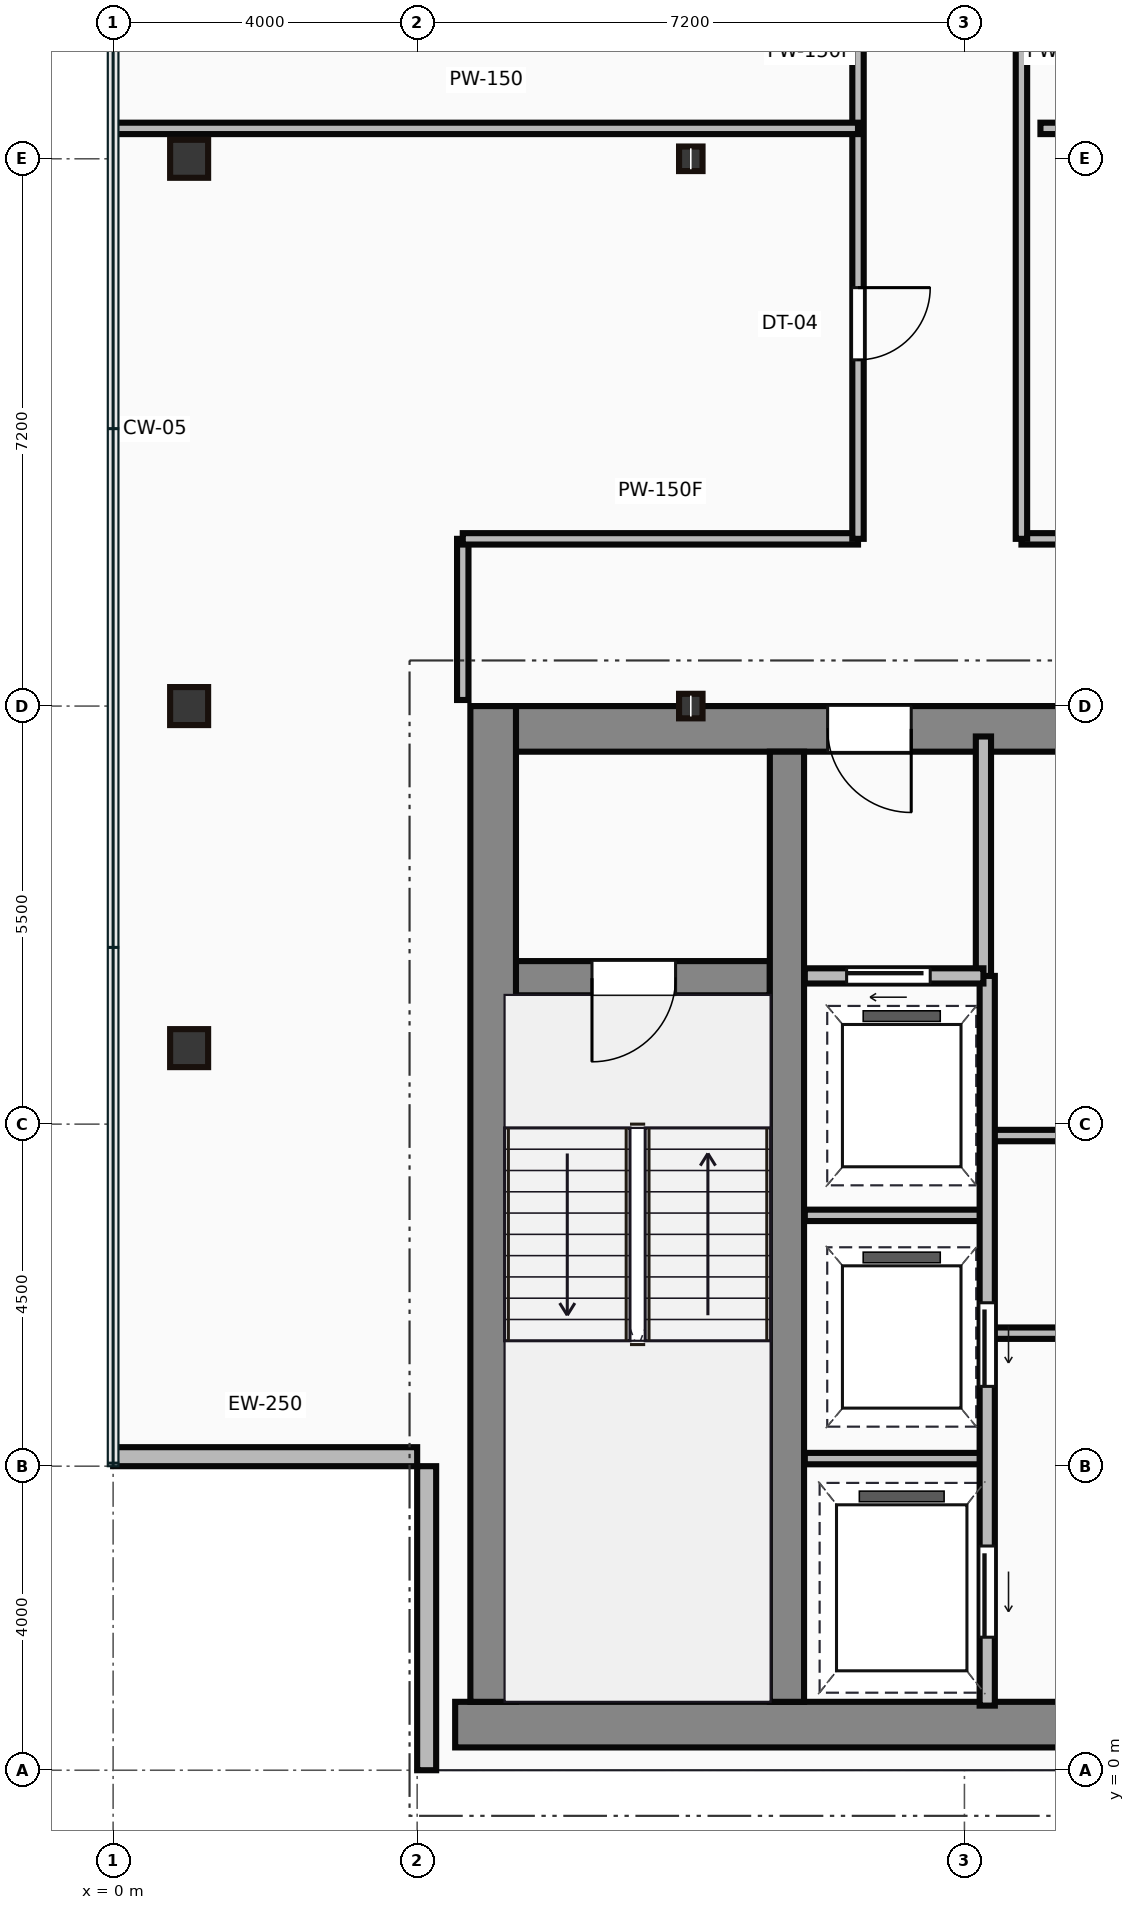
"""IFC4 building model, lengths in metres.
Left out: names, types, materials, properties, quantities, classifications, styles, units other than length and angle.
Written with IfcOpenShell. Run it as: python <this file> out.ifc"""

import sys

from ifc_helpers import new_model, si_unit, direction, frame, frame_2d, origin, origin_2d, place, context, subcontext, project, spatial, rectangle, hollow_rectangle, i_section, extrude, source, transform, mapped, element, fill, save


model = new_model("IFC4")
c1 = context("Model", 3, precision=1e-05, world=origin(), true_north=direction((0.0, 1.0)))
c2 = subcontext(c1, "Body", "Model", "MODEL_VIEW")
j1 = project(units=[si_unit("LENGTHUNIT", "METRE"), si_unit("PLANEANGLEUNIT", "RADIAN")], contexts=[c1])
p1 = place(None, origin())
s1 = spatial("IfcSite", under=j1, at=p1, CompositionType="ELEMENT")
p2 = place(p1, origin())
s2 = spatial("IfcBuilding", under=s1, at=p2, CompositionType="ELEMENT")
p3 = place(p2, frame((0.0, 0.0, 277.05)))
s3 = spatial("IfcBuildingStorey", under=s2, at=p3, CompositionType="ELEMENT", Elevation=277.05)
m1 = source(origin(), c2, "Body", "SweptSolid", [
    extrude(rectangle(XDim=29.5, YDim=0.6, at=frame_2d((14.75, 0.0))), origin(), (0.0, 0.0, 1.0), 3.65),
])
p4 = place(p3, frame((4.5, 0.6, 0.0), z_axis=(0.0, 0.0, 1.0), x_axis=(1.0, 0.0, 0.0)))
e1 = element("IfcWall", 1, at=p4, inside=s3, PredefinedType="SHEAR", context=c2, shape_type="MappedRepresentation", body=[
    mapped(m1, transform((0.0, 0.0, 0.0))),
])
m2 = source(origin(), c2, "Body", "SweptSolid", [
    extrude(rectangle(XDim=13.1, YDim=0.6, at=frame_2d((6.55, 0.0))), origin(), (0.0, 0.0, 1.0), 3.65),
])
p5 = place(p3, frame((5.0, 0.9, 0.0), z_axis=(0.0, 0.0, 1.0), x_axis=(0.0, 1.0, 0.0)))
e2 = element("IfcWall", 2, at=p5, inside=s3, PredefinedType="SHEAR", context=c2, shape_type="MappedRepresentation", body=[
    mapped(m2, transform((0.0, 0.0, 0.0))),
])
m3 = source(origin(), c2, "Body", "SweptSolid", [
    extrude(rectangle(XDim=9.1, YDim=0.6, at=frame_2d((4.55, 0.0))), origin(), (0.0, 0.0, 1.0), 3.65),
])
p6 = place(p3, frame((5.3, 13.7, 0.0), z_axis=(0.0, 0.0, 1.0), x_axis=(1.0, 0.0, 0.0)))
e3 = element("IfcWall", 3, at=p6, inside=s3, PredefinedType="SHEAR", context=c2, shape_type="MappedRepresentation", body=[
    mapped(m3, transform((0.0, 0.0, 0.0))),
])
p7 = place(p6, frame((4.1, 0.0, 0.0)))
e4 = element("IfcOpeningElement", 4, at=p7, cuts=e3, PredefinedType="OPENING", context=c2, shape_type="SweptSolid", body=[
    extrude(rectangle(XDim=1.1, YDim=2.15, at=frame_2d((0.55, 1.075))), frame((0.0, 0.31, 0.0), z_axis=(0.0, -1.0, 0.0), x_axis=(1.0, 0.0, 0.0)), (0.0, 0.0, 1.0), 0.62),
])
m4 = source(origin(), c2, "Body", "SweptSolid", [
    extrude(rectangle(XDim=12.5, YDim=0.45, at=frame_2d((6.25, 0.0))), origin(), (0.0, 0.0, 1.0), 3.65),
])
p8 = place(p3, frame((8.865, 0.9, 0.0), z_axis=(0.0, 0.0, 1.0), x_axis=(0.0, 1.0, 0.0)))
e5 = element("IfcWall", 5, at=p8, inside=s3, PredefinedType="SHEAR", context=c2, shape_type="MappedRepresentation", body=[
    mapped(m4, transform((0.0, 0.0, 0.0))),
])
m5 = source(origin(), c2, "Body", "SweptSolid", [
    extrude(rectangle(XDim=3.39, YDim=0.45, at=frame_2d((1.695, 0.0))), origin(), (0.0, 0.0, 1.0), 3.65),
])
p9 = place(p3, frame((5.25, 10.42, 0.0), z_axis=(0.0, 0.0, 1.0), x_axis=(1.0, 0.0, 0.0)))
e6 = element("IfcWall", 6, at=p9, inside=s3, PredefinedType="SHEAR", context=c2, shape_type="MappedRepresentation", body=[
    mapped(m5, transform((0.0, 0.0, 0.0))),
])
p10 = place(p9, frame((1.05, 0.0, 0.0)))
e7 = element("IfcOpeningElement", 7, at=p10, cuts=e6, PredefinedType="OPENING", context=c2, shape_type="SweptSolid", body=[
    extrude(rectangle(XDim=1.1, YDim=2.15, at=frame_2d((0.55, 1.075))), frame((0.0, 0.235, 0.0), z_axis=(0.0, -1.0, 0.0), x_axis=(1.0, 0.0, 0.0)), (0.0, 0.0, 1.0), 0.47),
])
m6 = source(origin(), c2, "Body", "SweptSolid", [
    extrude(hollow_rectangle(XDim=0.5, YDim=0.5, WallThickness=0.022, at=origin_2d()), origin(), (0.0, 0.0, 1.0), 3.65),
])
for number, where, z_axis, x_axis in (
    (8, (1.0, 9.5, 0.0), (0.0, 0.0, 1.0), (1.0, 0.0, 0.0)),
    (9, (1.0, 14.0, 0.0), (0.0, 0.0, 1.0), (1.0, 0.0, 0.0)),
    (10, (1.0, 21.2, 0.0), (0.0, 0.0, 1.0), (1.0, 0.0, 0.0)),
):
    element("IfcColumn", number, at=place(p3, frame(where, z_axis=z_axis, x_axis=x_axis)), inside=s3, PredefinedType="COLUMN", context=c2, shape_type="MappedRepresentation", body=[
        mapped(m6, transform((0.0, 0.0, 0.0))),
    ])
m7 = source(origin(), c2, "Body", "SweptSolid", [
    extrude(i_section(OverallWidth=0.309, OverallDepth=0.323, WebThickness=0.014, FlangeThickness=0.023, at=origin_2d()), origin(), (0.0, 0.0, 1.0), 3.65),
])
for number, where, z_axis, x_axis in (
    (11, (7.6, 14.0, 0.0), (0.0, 0.0, 1.0), (1.0, 0.0, 0.0)),
    (12, (7.6, 21.2, 0.0), (0.0, 0.0, 1.0), (1.0, 0.0, 0.0)),
):
    element("IfcColumn", number, at=place(p3, frame(where, z_axis=z_axis, x_axis=x_axis)), inside=s3, PredefinedType="COLUMN", context=c2, shape_type="MappedRepresentation", body=[
        mapped(m7, transform((0.0, 0.0, 0.0))),
    ])
m8 = source(origin(), c2, "Body", "SweptSolid", [
    extrude(rectangle(XDim=4.0, YDim=0.25, at=frame_2d((2.0, 0.0))), origin(), (0.0, 0.0, 1.0), 3.4),
])
for number, where, z_axis, x_axis in (
    (13, (0.0, 4.125, 0.0), (0.0, 0.0, 1.0), (1.0, 0.0, 0.0)),
    (14, (4.125, 4.0, 0.0), (0.0, 0.0, 1.0), (0.0, -1.0, 0.0)),
):
    element("IfcWall", number, at=place(p3, frame(where, z_axis=z_axis, x_axis=x_axis)), inside=s3, PredefinedType="STANDARD", context=c2, shape_type="MappedRepresentation", body=[
        mapped(m8, transform((0.0, 0.0, 0.0))),
    ])
m9 = source(origin(), c2, "Body", "SweptSolid", [
    extrude(rectangle(XDim=3.18, YDim=0.2, at=frame_2d((1.59, 0.0))), origin(), (0.0, 0.0, 1.0), 3.4),
])
p11 = place(p3, frame((11.45, 10.42, 0.0), z_axis=(0.0, 0.0, 1.0), x_axis=(0.0, 1.0, 0.0)))
e15 = element("IfcWall", 15, at=p11, inside=s3, PredefinedType="PARTITIONING", context=c2, shape_type="MappedRepresentation", body=[
    mapped(m9, transform((0.0, 0.0, 0.0))),
])
m10 = source(origin(), c2, "Body", "SweptSolid", [
    extrude(rectangle(XDim=2.35, YDim=0.2, at=frame_2d((1.175, 0.0))), origin(), (0.0, 0.0, 1.0), 3.4),
])
p12 = place(p3, frame((9.1, 10.45, 0.0), z_axis=(0.0, 0.0, 1.0), x_axis=(1.0, 0.0, 0.0)))
e16 = element("IfcWall", 16, at=p12, inside=s3, PredefinedType="PARTITIONING", context=c2, shape_type="MappedRepresentation", body=[
    mapped(m10, transform((0.0, 0.0, 0.0))),
])
p13 = place(p12, frame((0.55, 0.0, 0.0)))
e17 = element("IfcOpeningElement", 17, at=p13, cuts=e16, PredefinedType="OPENING", context=c2, shape_type="SweptSolid", body=[
    extrude(rectangle(XDim=1.1, YDim=2.15, at=frame_2d((0.55, 1.075))), frame((0.0, 0.11, 0.0), z_axis=(0.0, -1.0, 0.0), x_axis=(1.0, 0.0, 0.0)), (0.0, 0.0, 1.0), 0.22),
])
m11 = source(origin(), c2, "Body", "SweptSolid", [
    extrude(rectangle(XDim=9.6, YDim=0.2, at=frame_2d((4.8, 0.0))), origin(), (0.0, 0.0, 1.0), 3.4),
])
p14 = place(p3, frame((11.5, 0.85, 0.0), z_axis=(0.0, 0.0, 1.0), x_axis=(0.0, 1.0, 0.0)))
e18 = element("IfcWall", 18, at=p14, inside=s3, PredefinedType="PARTITIONING", context=c2, shape_type="MappedRepresentation", body=[
    mapped(m11, transform((0.0, 0.0, 0.0))),
])
p15 = place(p14, frame((4.2, 0.0, 0.0)))
e19 = element("IfcOpeningElement", 19, at=p15, cuts=e18, PredefinedType="OPENING", context=c2, shape_type="SweptSolid", body=[
    extrude(rectangle(XDim=1.1, YDim=2.15, at=frame_2d((0.55, 1.075))), frame((0.0, 0.11, 0.0), z_axis=(0.0, -1.0, 0.0), x_axis=(1.0, 0.0, 0.0)), (0.0, 0.0, 1.0), 0.22),
])
p16 = place(p14, frame((0.9, 0.0, 0.0)))
e20 = element("IfcOpeningElement", 20, at=p16, cuts=e18, PredefinedType="OPENING", context=c2, shape_type="SweptSolid", body=[
    extrude(rectangle(XDim=1.2, YDim=2.15, at=frame_2d((0.6, 1.075))), frame((0.0, 0.11, 0.0), z_axis=(0.0, -1.0, 0.0), x_axis=(1.0, 0.0, 0.0)), (0.0, 0.0, 1.0), 0.22),
])
m12 = source(origin(), c2, "Body", "SweptSolid", [
    extrude(rectangle(XDim=2.4, YDim=0.15, at=frame_2d((1.2, 0.0))), origin(), (0.0, 0.0, 1.0), 3.4),
])
for number, where, z_axis, x_axis in (
    (21, (9.1, 4.1, 0.0), (0.0, 0.0, 1.0), (1.0, 0.0, 0.0)),
    (22, (9.1, 7.3, 0.0), (0.0, 0.0, 1.0), (1.0, 0.0, 0.0)),
):
    element("IfcWall", number, at=place(p3, frame(where, z_axis=z_axis, x_axis=x_axis)), inside=s3, PredefinedType="PARTITIONING", context=c2, shape_type="MappedRepresentation", body=[
        mapped(m12, transform((0.0, 0.0, 0.0))),
    ])
m13 = source(origin(), c2, "Body", "SweptSolid", [
    extrude(rectangle(XDim=11.85, YDim=0.15, at=frame_2d((5.925, 0.0))), origin(), (0.0, 0.0, 1.0), 3.4),
])
p17 = place(p3, frame((11.55, 5.75, 0.0), z_axis=(0.0, 0.0, 1.0), x_axis=(1.0, 0.0, 0.0)))
e23 = element("IfcWall", 23, at=p17, inside=s3, PredefinedType="PARTITIONING", context=c2, shape_type="MappedRepresentation", body=[
    mapped(m13, transform((0.0, 0.0, 0.0))),
])
p18 = place(p3, frame((11.55, 8.35, 0.0), z_axis=(0.0, 0.0, 1.0), x_axis=(1.0, 0.0, 0.0)))
e24 = element("IfcWall", 24, at=p18, inside=s3, PredefinedType="PARTITIONING", context=c2, shape_type="MappedRepresentation", body=[
    mapped(m13, transform((0.0, 0.0, 0.0))),
])
p19 = place(p18, frame((1.1, 0.0, 0.0)))
e25 = element("IfcOpeningElement", 25, at=p19, cuts=e24, PredefinedType="OPENING", context=c2, shape_type="SweptSolid", body=[
    extrude(rectangle(XDim=0.95, YDim=2.15, at=frame_2d((0.475, 1.075))), frame((0.0, 0.085, 0.0), z_axis=(0.0, -1.0, 0.0), x_axis=(1.0, 0.0, 0.0)), (0.0, 0.0, 1.0), 0.17),
])
p20 = place(p18, frame((9.4, 0.0, 0.0)))
e26 = element("IfcOpeningElement", 26, at=p20, cuts=e24, PredefinedType="OPENING", context=c2, shape_type="SweptSolid", body=[
    extrude(rectangle(XDim=0.95, YDim=2.15, at=frame_2d((0.475, 1.075))), frame((0.0, 0.085, 0.0), z_axis=(0.0, -1.0, 0.0), x_axis=(1.0, 0.0, 0.0)), (0.0, 0.0, 1.0), 0.17),
])
m14 = source(origin(), c2, "Body", "SweptSolid", [
    extrude(rectangle(XDim=2.12, YDim=0.15, at=frame_2d((1.06, 0.0))), origin(), (0.0, 0.0, 1.0), 3.4),
])
p21 = place(p3, frame((4.6, 14.08, 0.0), z_axis=(0.0, 0.0, 1.0), x_axis=(0.0, 1.0, 0.0)))
e27 = element("IfcWall", 27, at=p21, inside=s3, PredefinedType="PARTITIONING", context=c2, shape_type="MappedRepresentation", body=[
    mapped(m14, transform((0.0, 0.0, 0.0))),
])
m15 = source(origin(), c2, "Body", "SweptSolid", [
    extrude(rectangle(XDim=5.2, YDim=0.15, at=frame_2d((2.6, 0.0))), origin(), (0.0, 0.0, 1.0), 3.4),
])
p22 = place(p3, frame((4.6, 16.2, 0.0), z_axis=(0.0, 0.0, 1.0), x_axis=(1.0, 0.0, 0.0)))
e28 = element("IfcWall", 28, at=p22, inside=s3, PredefinedType="PARTITIONING", context=c2, shape_type="MappedRepresentation", body=[
    mapped(m15, transform((0.0, 0.0, 0.0))),
])
m16 = source(origin(), c2, "Body", "SweptSolid", [
    extrude(rectangle(XDim=12.8, YDim=0.15, at=frame_2d((6.4, 0.0))), origin(), (0.0, 0.0, 1.0), 3.4),
])
p23 = place(p3, frame((9.8, 16.2, 0.0), z_axis=(0.0, 0.0, 1.0), x_axis=(0.0, 1.0, 0.0)))
e29 = element("IfcWall", 29, at=p23, inside=s3, PredefinedType="PARTITIONING", context=c2, shape_type="MappedRepresentation", body=[
    mapped(m16, transform((0.0, 0.0, 0.0))),
])
p24 = place(p23, frame((2.355, 0.0, 0.0)))
e30 = element("IfcOpeningElement", 30, at=p24, cuts=e29, PredefinedType="OPENING", context=c2, shape_type="SweptSolid", body=[
    extrude(rectangle(XDim=0.95, YDim=2.15, at=frame_2d((0.475, 1.075))), frame((0.0, 0.085, 0.0), z_axis=(0.0, -1.0, 0.0), x_axis=(1.0, 0.0, 0.0)), (0.0, 0.0, 1.0), 0.17),
])
p25 = place(p23, frame((8.495, 0.0, 0.0)))
e31 = element("IfcOpeningElement", 31, at=p25, cuts=e29, PredefinedType="OPENING", context=c2, shape_type="SweptSolid", body=[
    extrude(rectangle(XDim=0.95, YDim=2.15, at=frame_2d((0.475, 1.075))), frame((0.0, 0.085, 0.0), z_axis=(0.0, -1.0, 0.0), x_axis=(1.0, 0.0, 0.0)), (0.0, 0.0, 1.0), 0.17),
])
m17 = source(origin(), c2, "Body", "SweptSolid", [
    extrude(rectangle(XDim=11.65, YDim=0.15, at=frame_2d((5.825, 0.0))), origin(), (0.0, 0.0, 1.0), 3.4),
])
p26 = place(p3, frame((11.95, 16.2, 0.0), z_axis=(0.0, 0.0, 1.0), x_axis=(1.0, 0.0, 0.0)))
e32 = element("IfcWall", 32, at=p26, inside=s3, PredefinedType="PARTITIONING", context=c2, shape_type="MappedRepresentation", body=[
    mapped(m17, transform((0.0, 0.0, 0.0))),
])
p27 = place(p26, frame((5.35, 0.0, 0.0)))
e33 = element("IfcOpeningElement", 33, at=p27, cuts=e32, PredefinedType="OPENING", context=c2, shape_type="SweptSolid", body=[
    extrude(rectangle(XDim=0.95, YDim=2.15, at=frame_2d((0.475, 1.075))), frame((0.0, 0.085, 0.0), z_axis=(0.0, -1.0, 0.0), x_axis=(1.0, 0.0, 0.0)), (0.0, 0.0, 1.0), 0.17),
])
p28 = place(p3, frame((11.95, 29.0, 0.0), z_axis=(0.0, 0.0, 1.0), x_axis=(0.0, -1.0, 0.0)))
e34 = element("IfcWall", 34, at=p28, inside=s3, PredefinedType="PARTITIONING", context=c2, shape_type="MappedRepresentation", body=[
    mapped(m16, transform((0.0, 0.0, 0.0))),
])
m18 = source(origin(), c2, "Body", "SweptSolid", [
    extrude(rectangle(XDim=9.78, YDim=0.15, at=frame_2d((4.89, 0.0))), origin(), (0.0, 0.0, 1.0), 3.4),
])
p29 = place(p3, frame((0.02, 21.6, 0.0), z_axis=(0.0, 0.0, 1.0), x_axis=(1.0, 0.0, 0.0)))
e35 = element("IfcWall", 35, at=p29, inside=s3, PredefinedType="PARTITIONING", context=c2, shape_type="MappedRepresentation", body=[
    mapped(m18, transform((0.0, 0.0, 0.0))),
])
m19 = source(origin(), c2, "Body", "SweptSolid", [
    extrude(rectangle(XDim=11.4, YDim=0.15, at=frame_2d((5.7, 0.0))), origin(), (0.0, 0.0, 1.0), 3.4),
])
p30 = place(p3, frame((23.6, 21.6, 0.0), z_axis=(0.0, 0.0, 1.0), x_axis=(-1.0, 0.0, 0.0)))
e36 = element("IfcWall", 36, at=p30, inside=s3, PredefinedType="PARTITIONING", context=c2, shape_type="MappedRepresentation", body=[
    mapped(m19, transform((0.0, 0.0, 0.0))),
])
m20 = source(origin(), c2, "Body", "SweptSolid", [
    extrude(rectangle(XDim=1.1, YDim=2.15, at=frame_2d((0.55, 1.075))), frame((0.0, 0.025, 0.0), z_axis=(0.0, -1.0, 0.0), x_axis=(1.0, 0.0, 0.0)), (0.0, 0.0, 1.0), 0.05),
])
p31 = place(p10, frame((1.1, 0.0, 0.0), z_axis=(0.0, 0.0, 1.0), x_axis=(-1.0, 0.0, 0.0)))
e37 = element("IfcDoor", 37, at=p31, inside=s3, OperationType="SINGLE_SWING_LEFT", PredefinedType="DOOR", context=c2, shape_type="MappedRepresentation", body=[
    mapped(m20, transform((0.0, 0.0, 0.0))),
])
fill(e7, e37)
p32 = place(p7, origin())
e38 = element("IfcDoor", 38, at=p32, inside=s3, OperationType="SINGLE_SWING_RIGHT", PredefinedType="DOOR", context=c2, shape_type="MappedRepresentation", body=[
    mapped(m20, transform((0.0, 0.0, 0.0))),
])
fill(e4, e38)
p33 = place(p13, origin())
e39 = element("IfcDoor", 39, at=p33, inside=s3, OperationType="SLIDING_TO_LEFT", PredefinedType="DOOR", context=c2, shape_type="MappedRepresentation", body=[
    mapped(m20, transform((0.0, 0.0, 0.0))),
])
fill(e17, e39)
p34 = place(p15, frame((1.1, 0.0, 0.0), z_axis=(0.0, 0.0, 1.0), x_axis=(-1.0, 0.0, 0.0)))
e40 = element("IfcDoor", 40, at=p34, inside=s3, OperationType="SLIDING_TO_LEFT", PredefinedType="DOOR", context=c2, shape_type="MappedRepresentation", body=[
    mapped(m20, transform((0.0, 0.0, 0.0))),
])
fill(e19, e40)
m21 = source(origin(), c2, "Body", "SweptSolid", [
    extrude(rectangle(XDim=1.2, YDim=2.15, at=frame_2d((0.6, 1.075))), frame((0.0, 0.025, 0.0), z_axis=(0.0, -1.0, 0.0), x_axis=(1.0, 0.0, 0.0)), (0.0, 0.0, 1.0), 0.05),
])
p35 = place(p16, frame((1.2, 0.0, 0.0), z_axis=(0.0, 0.0, 1.0), x_axis=(-1.0, 0.0, 0.0)))
e41 = element("IfcDoor", 41, at=p35, inside=s3, OperationType="SLIDING_TO_LEFT", PredefinedType="DOOR", context=c2, shape_type="MappedRepresentation", body=[
    mapped(m21, transform((0.0, 0.0, 0.0))),
])
fill(e20, e41)
m22 = source(origin(), c2, "Body", "SweptSolid", [
    extrude(rectangle(XDim=0.95, YDim=2.15, at=frame_2d((0.475, 1.075))), frame((0.0, 0.025, 0.0), z_axis=(0.0, -1.0, 0.0), x_axis=(1.0, 0.0, 0.0)), (0.0, 0.0, 1.0), 0.05),
])
p36 = place(p24, origin())
e42 = element("IfcDoor", 42, at=p36, inside=s3, OperationType="SINGLE_SWING_RIGHT", PredefinedType="DOOR", context=c2, shape_type="MappedRepresentation", body=[
    mapped(m22, transform((0.0, 0.0, 0.0))),
])
fill(e30, e42)
save(model, sys.argv[1])
